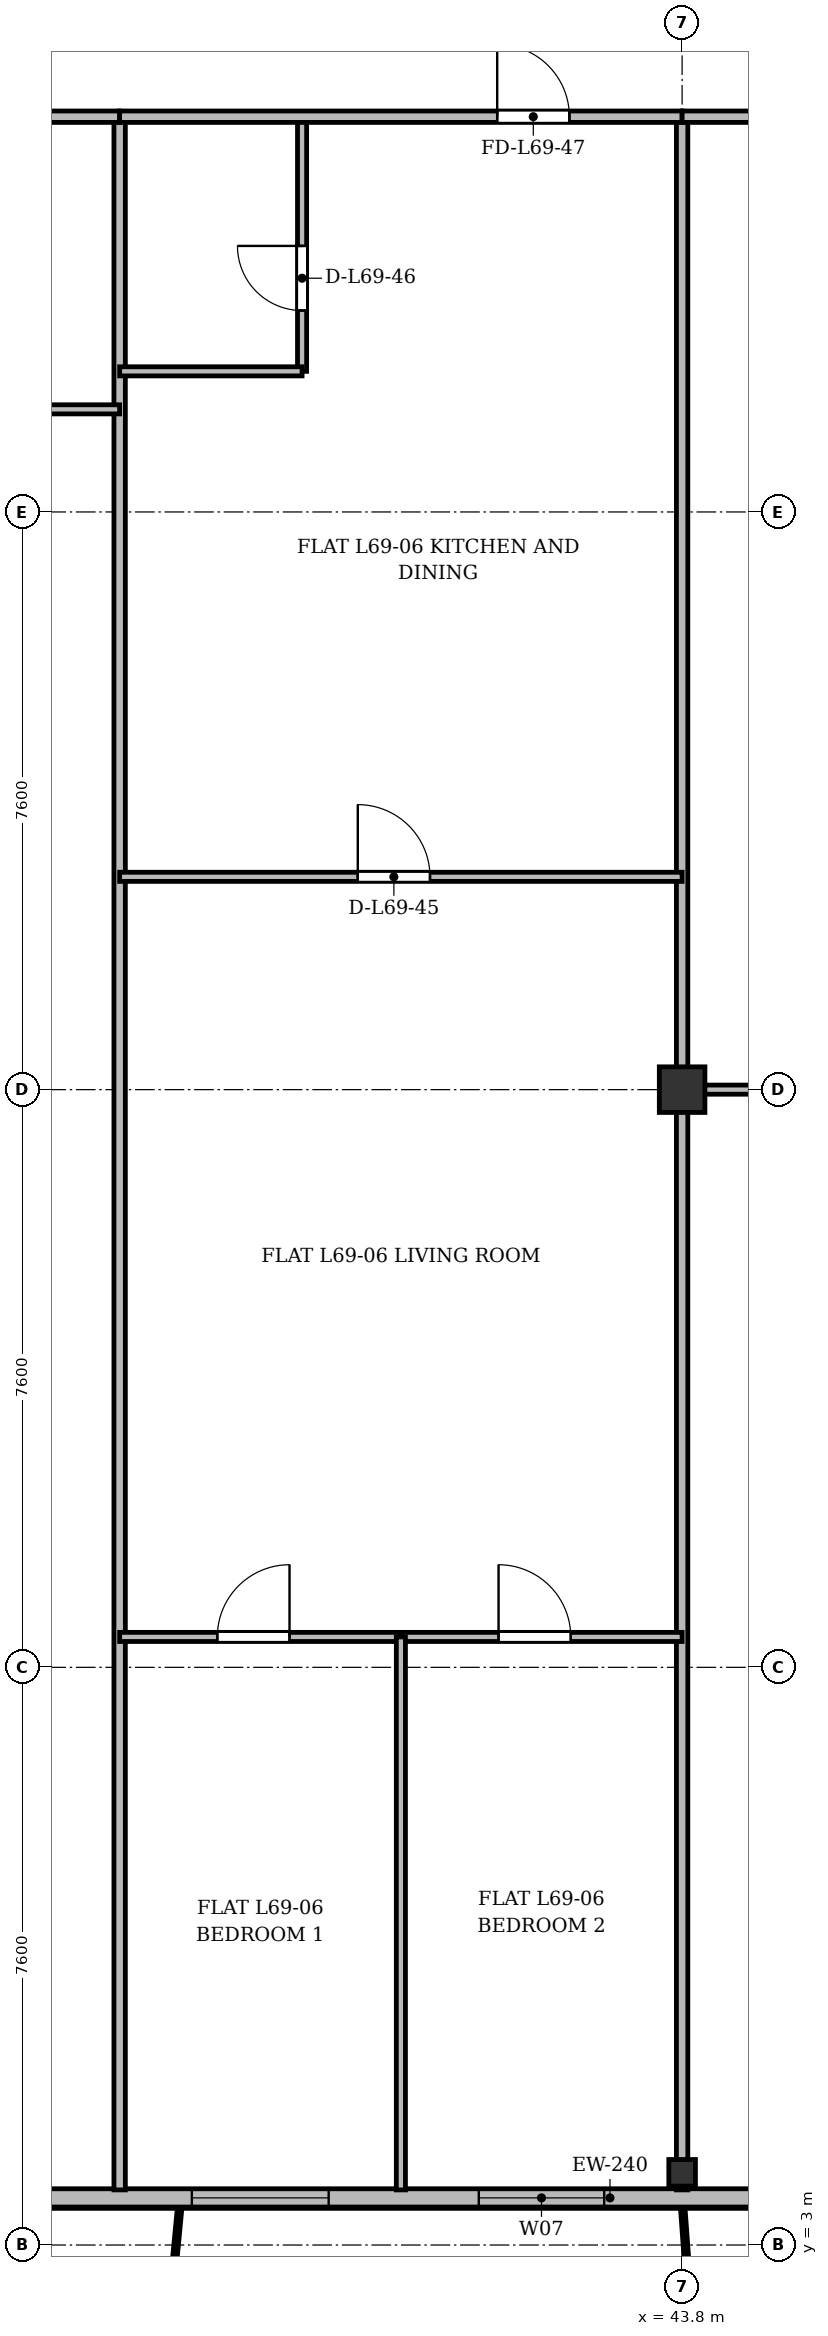
"""IFC4 building model, lengths in metres.
Left out: names, types, materials, properties, quantities, classifications, styles, units other than length and angle.
Written with IfcOpenShell. Run it as: python <this file> out.ifc"""

import sys

from ifc_helpers import new_model, si_unit, direction, frame, frame_2d, origin, origin_2d, place, context, subcontext, project, spatial, rectangle, i_section, extrude, source, transform, mapped, element, fill, save


model = new_model("IFC4")
c1 = context("Model", 3, precision=1e-05, world=origin(), true_north=direction((0.0, 1.0)))
c2 = subcontext(c1, "Body", "Model", "MODEL_VIEW")
j1 = project(units=[si_unit("LENGTHUNIT", "METRE"), si_unit("PLANEANGLEUNIT", "RADIAN")], contexts=[c1])
p1 = place(None, origin())
s1 = spatial("IfcSite", under=j1, at=p1, CompositionType="ELEMENT")
p2 = place(p1, origin())
s2 = spatial("IfcBuilding", under=s1, at=p2, CompositionType="ELEMENT")
p3 = place(p2, frame((0.0, 0.0, 266.7)))
s3 = spatial("IfcBuildingStorey", under=s2, at=p3, CompositionType="ELEMENT", Elevation=266.7)
m1 = source(origin(), c2, "Body", "SweptSolid", [
    extrude(i_section(OverallWidth=0.35, OverallDepth=0.35, WebThickness=0.018, FlangeThickness=0.028, at=origin_2d()), origin(), (0.0, 0.0, 1.0), 3.6),
])
p4 = place(p3, frame((43.8, 3.95, 0.0), z_axis=(0.0, 0.0, 1.0), x_axis=(1.0, 0.0, 0.0)))
e1 = element("IfcColumn", 1, at=p4, inside=s3, PredefinedType="COLUMN", context=c2, shape_type="MappedRepresentation", body=[
    mapped(m1, transform((0.0, 0.0, 0.0), x_axis=(1.0, 0.0, 0.0), y_axis=(0.0, 1.0, 0.0), z_axis=(0.0, 0.0, 1.0), scale=1.0)),
])
m2 = source(origin(), c2, "Body", "SweptSolid", [
    extrude(rectangle(XDim=0.6, YDim=0.6, at=origin_2d()), origin(), (0.0, 0.0, 1.0), 3.6),
])
p5 = place(p3, frame((43.8, 18.2, 0.0), z_axis=(0.0, 0.0, 1.0), x_axis=(1.0, 0.0, 0.0)))
e2 = element("IfcColumn", 2, at=p5, inside=s3, PredefinedType="COLUMN", context=c2, shape_type="MappedRepresentation", body=[
    mapped(m2, transform((0.0, 0.0, 0.0), x_axis=(1.0, 0.0, 0.0), y_axis=(0.0, 1.0, 0.0), z_axis=(0.0, 0.0, 1.0), scale=1.0)),
])
p6 = place(p3, frame((63.2, 3.62, 0.0), z_axis=(0.0, 0.0, 1.0), x_axis=(-1.0, 0.0, 0.0)))
e3 = element("IfcWall", 3, at=p6, inside=s3, PredefinedType="SOLIDWALL", context=c2, shape_type="SweptSolid", body=[
    extrude(rectangle(XDim=52.0, YDim=0.24, at=frame_2d((26.0, 0.0))), origin(), (0.0, 0.0, 1.0), 3.37),
])
p7 = place(p6, frame((0.345, 0.0, 0.9)))
e4 = element("IfcOpeningElement", 4, at=p7, cuts=e3, PredefinedType="OPENING", context=c2, shape_type="SweptSolid", body=[
    extrude(rectangle(XDim=1.2, YDim=1.65, at=frame_2d((0.6, 0.825))), frame((0.0, 0.13, 0.0), z_axis=(0.0, -1.0, 0.0), x_axis=(1.0, 0.0, 0.0)), (0.0, 0.0, 1.0), 0.26),
])
p8 = place(p6, frame((2.15, 0.0, 0.9)))
e5 = element("IfcOpeningElement", 5, at=p8, cuts=e3, PredefinedType="OPENING", context=c2, shape_type="SweptSolid", body=[
    extrude(rectangle(XDim=1.8, YDim=1.8, at=frame_2d((0.9, 0.9))), frame((0.0, 0.13, 0.0), z_axis=(0.0, -1.0, 0.0), x_axis=(1.0, 0.0, 0.0)), (0.0, 0.0, 1.0), 0.26),
])
p9 = place(p6, frame((5.42, 0.0, 0.0)))
e6 = element("IfcOpeningElement", 6, at=p9, cuts=e3, PredefinedType="OPENING", context=c2, shape_type="SweptSolid", body=[
    extrude(rectangle(XDim=1.2, YDim=2.2, at=frame_2d((0.6, 1.1))), frame((0.0, 0.13, 0.0), z_axis=(0.0, -1.0, 0.0), x_axis=(1.0, 0.0, 0.0)), (0.0, 0.0, 1.0), 0.26),
])
p10 = place(p6, frame((8.75, 0.0, 0.9)))
e7 = element("IfcOpeningElement", 7, at=p10, cuts=e3, PredefinedType="OPENING", context=c2, shape_type="SweptSolid", body=[
    extrude(rectangle(XDim=1.5, YDim=1.75, at=frame_2d((0.75, 0.875))), frame((0.0, 0.13, 0.0), z_axis=(0.0, -1.0, 0.0), x_axis=(1.0, 0.0, 0.0)), (0.0, 0.0, 1.0), 0.26),
])
p11 = place(p6, frame((14.8, 0.0, 0.9)))
e8 = element("IfcOpeningElement", 8, at=p11, cuts=e3, PredefinedType="OPENING", context=c2, shape_type="SweptSolid", body=[
    extrude(rectangle(XDim=2.0, YDim=1.95, at=frame_2d((1.0, 0.975))), frame((0.0, 0.13, 0.0), z_axis=(0.0, -1.0, 0.0), x_axis=(1.0, 0.0, 0.0)), (0.0, 0.0, 1.0), 0.26),
])
p12 = place(p6, frame((20.425, 0.0, 0.9)))
e9 = element("IfcOpeningElement", 9, at=p12, cuts=e3, PredefinedType="OPENING", context=c2, shape_type="SweptSolid", body=[
    extrude(rectangle(XDim=1.65, YDim=1.85, at=frame_2d((0.825, 0.925))), frame((0.0, 0.13, 0.0), z_axis=(0.0, -1.0, 0.0), x_axis=(1.0, 0.0, 0.0)), (0.0, 0.0, 1.0), 0.26),
])
p13 = place(p6, frame((24.05, 0.0, 0.9)))
e10 = element("IfcOpeningElement", 10, at=p13, cuts=e3, PredefinedType="OPENING", context=c2, shape_type="SweptSolid", body=[
    extrude(rectangle(XDim=1.8, YDim=1.8, at=frame_2d((0.9, 0.9))), frame((0.0, 0.13, 0.0), z_axis=(0.0, -1.0, 0.0), x_axis=(1.0, 0.0, 0.0)), (0.0, 0.0, 1.0), 0.26),
])
p14 = place(p6, frame((28.6, 0.0, 0.9)))
e11 = element("IfcOpeningElement", 11, at=p14, cuts=e3, PredefinedType="OPENING", context=c2, shape_type="SweptSolid", body=[
    extrude(rectangle(XDim=2.2, YDim=1.8, at=frame_2d((1.1, 0.9))), frame((0.0, 0.13, 0.0), z_axis=(0.0, -1.0, 0.0), x_axis=(1.0, 0.0, 0.0)), (0.0, 0.0, 1.0), 0.26),
])
p15 = place(p6, frame((34.078, 0.0, 0.0)))
e12 = element("IfcOpeningElement", 12, at=p15, cuts=e3, PredefinedType="OPENING", context=c2, shape_type="SweptSolid", body=[
    extrude(rectangle(XDim=1.2, YDim=2.2, at=frame_2d((0.6, 1.1))), frame((0.0, 0.13, 0.0), z_axis=(0.0, -1.0, 0.0), x_axis=(1.0, 0.0, 0.0)), (0.0, 0.0, 1.0), 0.26),
])
p16 = place(p6, frame((37.0, 0.0, 0.9)))
e13 = element("IfcOpeningElement", 13, at=p16, cuts=e3, PredefinedType="OPENING", context=c2, shape_type="SweptSolid", body=[
    extrude(rectangle(XDim=2.0, YDim=1.95, at=frame_2d((1.0, 0.975))), frame((0.0, 0.13, 0.0), z_axis=(0.0, -1.0, 0.0), x_axis=(1.0, 0.0, 0.0)), (0.0, 0.0, 1.0), 0.26),
])
p17 = place(p6, frame((41.075, 0.0, 0.9)))
e14 = element("IfcOpeningElement", 14, at=p17, cuts=e3, PredefinedType="OPENING", context=c2, shape_type="SweptSolid", body=[
    extrude(rectangle(XDim=1.65, YDim=1.85, at=frame_2d((0.825, 0.925))), frame((0.0, 0.13, 0.0), z_axis=(0.0, -1.0, 0.0), x_axis=(1.0, 0.0, 0.0)), (0.0, 0.0, 1.0), 0.26),
])
p18 = place(p6, frame((44.19, 0.0, 0.9)))
e15 = element("IfcOpeningElement", 15, at=p18, cuts=e3, PredefinedType="OPENING", context=c2, shape_type="SweptSolid", body=[
    extrude(rectangle(XDim=1.8, YDim=1.8, at=frame_2d((0.9, 0.9))), frame((0.0, 0.13, 0.0), z_axis=(0.0, -1.0, 0.0), x_axis=(1.0, 0.0, 0.0)), (0.0, 0.0, 1.0), 0.26),
])
p19 = place(p6, frame((50.005, 0.0, 0.9)))
e16 = element("IfcOpeningElement", 16, at=p19, cuts=e3, PredefinedType="OPENING", context=c2, shape_type="SweptSolid", body=[
    extrude(rectangle(XDim=1.5, YDim=1.75, at=frame_2d((0.75, 0.875))), frame((0.0, 0.13, 0.0), z_axis=(0.0, -1.0, 0.0), x_axis=(1.0, 0.0, 0.0)), (0.0, 0.0, 1.0), 0.26),
])
p20 = place(p3, frame((36.4, 3.725, 0.0), z_axis=(0.0, 0.0, 1.0), x_axis=(0.0, 1.0, 0.0)))
e17 = element("IfcWall", 17, at=p20, inside=s3, PredefinedType="PARTITIONING", context=c2, shape_type="SweptSolid", body=[
    extrude(rectangle(XDim=27.275, YDim=0.15, at=frame_2d((13.637, 0.0))), origin(), (0.0, 0.0, 1.0), 2.92),
])
p21 = place(p3, frame((43.8, 3.725, 0.0), z_axis=(0.0, 0.0, 1.0), x_axis=(0.0, 1.0, 0.0)))
e18 = element("IfcWall", 18, at=p21, inside=s3, PredefinedType="PARTITIONING", context=c2, shape_type="SweptSolid", body=[
    extrude(rectangle(XDim=27.275, YDim=0.15, at=frame_2d((13.637, 0.0))), origin(), (0.0, 0.0, 1.0), 2.87),
])
p22 = place(p3, frame((30.6, 31.0, 0.0), z_axis=(0.0, 0.0, 1.0), x_axis=(1.0, 0.0, 0.0)))
e19 = element("IfcWall", 19, at=p22, inside=s3, PredefinedType="PARTITIONING", context=c2, shape_type="SweptSolid", body=[
    extrude(rectangle(XDim=5.8, YDim=0.15, at=frame_2d((2.9, 0.0))), origin(), (0.0, 0.0, 1.0), 2.87),
])
p23 = place(p22, frame((2.425, 0.0, 0.0)))
e20 = element("IfcOpeningElement", 20, at=p23, cuts=e19, PredefinedType="OPENING", context=c2, shape_type="SweptSolid", body=[
    extrude(rectangle(XDim=0.95, YDim=2.15, at=frame_2d((0.475, 1.075))), frame((0.0, 0.085, 0.0), z_axis=(0.0, -1.0, 0.0), x_axis=(1.0, 0.0, 0.0)), (0.0, 0.0, 1.0), 0.17),
])
p24 = place(p3, frame((30.6, 27.15, 0.0), z_axis=(0.0, 0.0, 1.0), x_axis=(1.0, 0.0, 0.0)))
e21 = element("IfcWall", 21, at=p24, inside=s3, PredefinedType="PARTITIONING", context=c2, shape_type="SweptSolid", body=[
    extrude(rectangle(XDim=5.8, YDim=0.12, at=frame_2d((2.9, 0.0))), origin(), (0.0, 0.0, 1.0), 2.87),
])
p25 = place(p24, frame((2.425, 0.0, 0.0)))
e22 = element("IfcOpeningElement", 22, at=p25, cuts=e21, PredefinedType="OPENING", context=c2, shape_type="SweptSolid", body=[
    extrude(rectangle(XDim=0.95, YDim=2.15, at=frame_2d((0.475, 1.075))), frame((0.0, 0.07, 0.0), z_axis=(0.0, -1.0, 0.0), x_axis=(1.0, 0.0, 0.0)), (0.0, 0.0, 1.0), 0.14),
])
p26 = place(p3, frame((36.4, 21.0, 0.0), z_axis=(0.0, 0.0, 1.0), x_axis=(1.0, 0.0, 0.0)))
e23 = element("IfcWall", 23, at=p26, inside=s3, PredefinedType="PARTITIONING", context=c2, shape_type="SweptSolid", body=[
    extrude(rectangle(XDim=7.4, YDim=0.12, at=frame_2d((3.7, 0.0))), origin(), (0.0, 0.0, 1.0), 2.87),
])
p27 = place(p26, frame((3.133, 0.0, 0.0)))
e24 = element("IfcOpeningElement", 24, at=p27, cuts=e23, PredefinedType="OPENING", context=c2, shape_type="SweptSolid", body=[
    extrude(rectangle(XDim=0.95, YDim=2.15, at=frame_2d((0.475, 1.075))), frame((0.0, 0.07, 0.0), z_axis=(0.0, -1.0, 0.0), x_axis=(1.0, 0.0, 0.0)), (0.0, 0.0, 1.0), 0.14),
])
p28 = place(p3, frame((38.8, 27.65, 0.0), z_axis=(0.0, 0.0, 1.0), x_axis=(0.0, 1.0, 0.0)))
e25 = element("IfcWall", 25, at=p28, inside=s3, PredefinedType="PARTITIONING", context=c2, shape_type="SweptSolid", body=[
    extrude(rectangle(XDim=3.35, YDim=0.12, at=frame_2d((1.675, 0.0))), origin(), (0.0, 0.0, 1.0), 3.37),
])
p29 = place(p28, frame((0.8, 0.0, 0.0)))
e26 = element("IfcOpeningElement", 26, at=p29, cuts=e25, PredefinedType="OPENING", context=c2, shape_type="SweptSolid", body=[
    extrude(rectangle(XDim=0.85, YDim=2.1, at=frame_2d((0.425, 1.05))), frame((0.0, 0.07, 0.0), z_axis=(0.0, -1.0, 0.0), x_axis=(1.0, 0.0, 0.0)), (0.0, 0.0, 1.0), 0.14),
])
p30 = place(p3, frame((36.4, 27.65, 0.0), z_axis=(0.0, 0.0, 1.0), x_axis=(1.0, 0.0, 0.0)))
e27 = element("IfcWall", 27, at=p30, inside=s3, PredefinedType="PARTITIONING", context=c2, shape_type="SweptSolid", body=[
    extrude(rectangle(XDim=2.4, YDim=0.12, at=frame_2d((1.2, 0.0))), origin(), (0.0, 0.0, 1.0), 3.37),
])
p31 = place(p3, frame((36.4, 31.0, 0.0), z_axis=(0.0, 0.0, 1.0), x_axis=(1.0, 0.0, 0.0)))
e28 = element("IfcWall", 28, at=p31, inside=s3, PredefinedType="PARTITIONING", context=c2, shape_type="SweptSolid", body=[
    extrude(rectangle(XDim=7.4, YDim=0.15, at=frame_2d((3.7, 0.0))), origin(), (0.0, 0.0, 1.0), 2.87),
])
p32 = place(p31, frame((4.967, 0.0, 0.0)))
e29 = element("IfcOpeningElement", 29, at=p32, cuts=e28, PredefinedType="OPENING", context=c2, shape_type="SweptSolid", body=[
    extrude(rectangle(XDim=0.95, YDim=2.15, at=frame_2d((0.475, 1.075))), frame((0.0, 0.085, 0.0), z_axis=(0.0, -1.0, 0.0), x_axis=(1.0, 0.0, 0.0)), (0.0, 0.0, 1.0), 0.17),
])
p33 = place(p3, frame((36.4, 11.0, 0.0), z_axis=(0.0, 0.0, 1.0), x_axis=(1.0, 0.0, 0.0)))
e30 = element("IfcWall", 30, at=p33, inside=s3, PredefinedType="PARTITIONING", context=c2, shape_type="SweptSolid", body=[
    extrude(rectangle(XDim=3.7, YDim=0.12, at=frame_2d((1.85, 0.0))), origin(), (0.0, 0.0, 1.0), 3.37),
])
p34 = place(p33, frame((1.285, 0.0, 0.0)))
e31 = element("IfcOpeningElement", 31, at=p34, cuts=e30, PredefinedType="OPENING", context=c2, shape_type="SweptSolid", body=[
    extrude(rectangle(XDim=0.95, YDim=2.15, at=frame_2d((0.475, 1.075))), frame((0.0, 0.07, 0.0), z_axis=(0.0, -1.0, 0.0), x_axis=(1.0, 0.0, 0.0)), (0.0, 0.0, 1.0), 0.14),
])
p35 = place(p3, frame((40.1, 11.0, 0.0), z_axis=(0.0, 0.0, 1.0), x_axis=(1.0, 0.0, 0.0)))
e32 = element("IfcWall", 32, at=p35, inside=s3, PredefinedType="PARTITIONING", context=c2, shape_type="SweptSolid", body=[
    extrude(rectangle(XDim=3.7, YDim=0.12, at=frame_2d((1.85, 0.0))), origin(), (0.0, 0.0, 1.0), 2.87),
])
p36 = place(p35, frame((1.285, 0.0, 0.0)))
e33 = element("IfcOpeningElement", 33, at=p36, cuts=e32, PredefinedType="OPENING", context=c2, shape_type="SweptSolid", body=[
    extrude(rectangle(XDim=0.95, YDim=2.15, at=frame_2d((0.475, 1.075))), frame((0.0, 0.07, 0.0), z_axis=(0.0, -1.0, 0.0), x_axis=(1.0, 0.0, 0.0)), (0.0, 0.0, 1.0), 0.14),
])
p37 = place(p3, frame((40.1, 3.725, 0.0), z_axis=(0.0, 0.0, 1.0), x_axis=(0.0, 1.0, 0.0)))
e34 = element("IfcWall", 34, at=p37, inside=s3, PredefinedType="PARTITIONING", context=c2, shape_type="SweptSolid", body=[
    extrude(rectangle(XDim=7.275, YDim=0.12, at=frame_2d((3.637, 0.0))), origin(), (0.0, 0.0, 1.0), 2.92),
])
p38 = place(p3, frame((43.8, 31.0, 0.0), z_axis=(0.0, 0.0, 1.0), x_axis=(1.0, 0.0, 0.0)))
e35 = element("IfcWall", 35, at=p38, inside=s3, PredefinedType="PARTITIONING", context=c2, shape_type="SweptSolid", body=[
    extrude(rectangle(XDim=7.2, YDim=0.15, at=frame_2d((3.6, 0.0))), origin(), (0.0, 0.0, 1.0), 2.87),
])
p39 = place(p38, frame((3.125, 0.0, 0.0)))
e36 = element("IfcOpeningElement", 36, at=p39, cuts=e35, PredefinedType="OPENING", context=c2, shape_type="SweptSolid", body=[
    extrude(rectangle(XDim=0.95, YDim=2.15, at=frame_2d((0.475, 1.075))), frame((0.0, 0.085, 0.0), z_axis=(0.0, -1.0, 0.0), x_axis=(1.0, 0.0, 0.0)), (0.0, 0.0, 1.0), 0.17),
])
p40 = place(p3, frame((43.8, 18.2, 0.0), z_axis=(0.0, 0.0, 1.0), x_axis=(1.0, 0.0, 0.0)))
e37 = element("IfcWall", 37, at=p40, inside=s3, PredefinedType="PARTITIONING", context=c2, shape_type="SweptSolid", body=[
    extrude(rectangle(XDim=7.2, YDim=0.12, at=frame_2d((3.6, 0.0))), origin(), (0.0, 0.0, 1.0), 2.92),
])
p41 = place(p40, frame((3.125, 0.0, 0.0)))
e38 = element("IfcOpeningElement", 38, at=p41, cuts=e37, PredefinedType="OPENING", context=c2, shape_type="SweptSolid", body=[
    extrude(rectangle(XDim=0.95, YDim=2.15, at=frame_2d((0.475, 1.075))), frame((0.0, 0.07, 0.0), z_axis=(0.0, -1.0, 0.0), x_axis=(1.0, 0.0, 0.0)), (0.0, 0.0, 1.0), 0.14),
])
m3 = source(origin(), c2, "Body", "SweptSolid", [
    extrude(rectangle(XDim=1.65, YDim=1.85, at=frame_2d((0.825, 0.925))), frame((0.0, 0.03, 0.0), z_axis=(0.0, -1.0, 0.0), x_axis=(1.0, 0.0, 0.0)), (0.0, 0.0, 1.0), 0.06),
])
p42 = place(p12, origin())
e39 = element("IfcWindow", 39, at=p42, inside=s3, PartitioningType="SINGLE_PANEL", PredefinedType="WINDOW", context=c2, shape_type="MappedRepresentation", body=[
    mapped(m3, transform((0.0, 0.0, 0.0), x_axis=(1.0, 0.0, 0.0), y_axis=(0.0, 1.0, 0.0), z_axis=(0.0, 0.0, 1.0), scale=1.0)),
])
fill(e9, e39)
m4 = source(origin(), c2, "Body", "SweptSolid", [
    extrude(rectangle(XDim=1.8, YDim=1.8, at=frame_2d((0.9, 0.9))), frame((0.0, 0.03, 0.0), z_axis=(0.0, -1.0, 0.0), x_axis=(1.0, 0.0, 0.0)), (0.0, 0.0, 1.0), 0.06),
])
p43 = place(p13, origin())
e40 = element("IfcWindow", 40, at=p43, inside=s3, PartitioningType="SINGLE_PANEL", PredefinedType="WINDOW", context=c2, shape_type="MappedRepresentation", body=[
    mapped(m4, transform((0.0, 0.0, 0.0), x_axis=(1.0, 0.0, 0.0), y_axis=(0.0, 1.0, 0.0), z_axis=(0.0, 0.0, 1.0), scale=1.0)),
])
fill(e10, e40)
m5 = source(origin(), c2, "Body", "SweptSolid", [
    extrude(rectangle(XDim=0.95, YDim=2.15, at=frame_2d((0.475, 1.075))), frame((0.0, 0.025, 0.0), z_axis=(0.0, -1.0, 0.0), x_axis=(1.0, 0.0, 0.0)), (0.0, 0.0, 1.0), 0.05),
])
p44 = place(p27, origin())
e41 = element("IfcDoor", 41, at=p44, inside=s3, OperationType="SINGLE_SWING_LEFT", PredefinedType="DOOR", context=c2, shape_type="MappedRepresentation", body=[
    mapped(m5, transform((0.0, 0.0, 0.0), x_axis=(1.0, 0.0, 0.0), y_axis=(0.0, 1.0, 0.0), z_axis=(0.0, 0.0, 1.0), scale=1.0)),
])
fill(e24, e41)
m6 = source(origin(), c2, "Body", "SweptSolid", [
    extrude(rectangle(XDim=0.85, YDim=2.1, at=frame_2d((0.425, 1.05))), frame((0.0, 0.025, 0.0), z_axis=(0.0, -1.0, 0.0), x_axis=(1.0, 0.0, 0.0)), (0.0, 0.0, 1.0), 0.05),
])
p45 = place(p29, origin())
e42 = element("IfcDoor", 42, at=p45, inside=s3, OperationType="SINGLE_SWING_RIGHT", PredefinedType="DOOR", context=c2, shape_type="MappedRepresentation", body=[
    mapped(m6, transform((0.0, 0.0, 0.0), x_axis=(1.0, 0.0, 0.0), y_axis=(0.0, 1.0, 0.0), z_axis=(0.0, 0.0, 1.0), scale=1.0)),
])
fill(e26, e42)
p46 = place(p32, origin())
e43 = element("IfcDoor", 43, at=p46, inside=s3, OperationType="SINGLE_SWING_LEFT", PredefinedType="DOOR", context=c2, shape_type="MappedRepresentation", body=[
    mapped(m5, transform((0.0, 0.0, 0.0), x_axis=(1.0, 0.0, 0.0), y_axis=(0.0, 1.0, 0.0), z_axis=(0.0, 0.0, 1.0), scale=1.0)),
])
fill(e29, e43)
p47 = place(p34, origin())
e44 = element("IfcDoor", 44, at=p47, inside=s3, OperationType="SINGLE_SWING_RIGHT", PredefinedType="DOOR", context=c2, shape_type="MappedRepresentation", body=[
    mapped(m5, transform((0.0, 0.0, 0.0), x_axis=(1.0, 0.0, 0.0), y_axis=(0.0, 1.0, 0.0), z_axis=(0.0, 0.0, 1.0), scale=1.0)),
])
fill(e31, e44)
p48 = place(p36, origin())
e45 = element("IfcDoor", 45, at=p48, inside=s3, OperationType="SINGLE_SWING_LEFT", PredefinedType="DOOR", context=c2, shape_type="MappedRepresentation", body=[
    mapped(m5, transform((0.0, 0.0, 0.0), x_axis=(1.0, 0.0, 0.0), y_axis=(0.0, 1.0, 0.0), z_axis=(0.0, 0.0, 1.0), scale=1.0)),
])
fill(e33, e45)
save(model, sys.argv[1])
